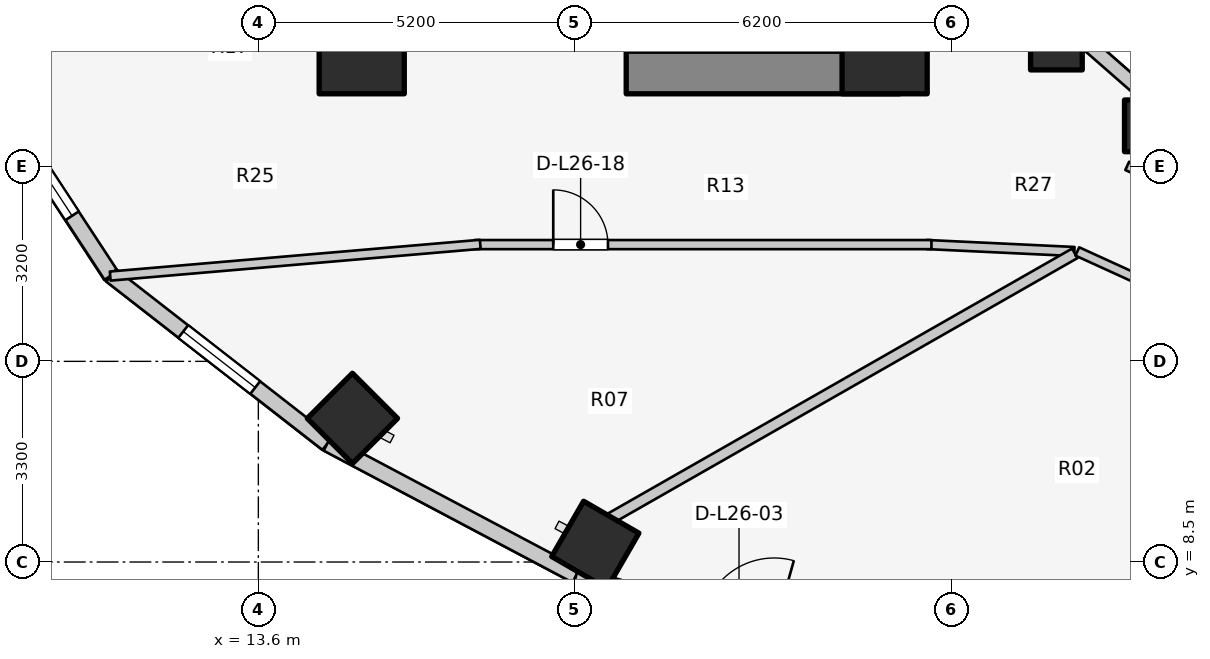
"""IFC4 building model, lengths in metres.
Left out: names, types, materials, properties, quantities, classifications, styles, units other than length and angle.
Written with IfcOpenShell. Run it as: python <this file> out.ifc"""

import sys

from ifc_helpers import new_model, si_unit, direction, frame, frame_2d, origin, origin_2d, place, context, subcontext, project, spatial, rectangle, extrude, element, fill, save


model = new_model("IFC4")
c1 = context("Model", 3, precision=1e-05, world=origin(), true_north=direction((0.0, 1.0)))
c2 = subcontext(c1, "Body", "Model", "MODEL_VIEW")
j1 = project(units=[si_unit("LENGTHUNIT", "METRE"), si_unit("PLANEANGLEUNIT", "RADIAN")], contexts=[c1])
p1 = place(None, origin())
s1 = spatial("IfcSite", under=j1, at=p1, CompositionType="ELEMENT")
p2 = place(p1, origin())
s2 = spatial("IfcBuilding", under=s1, at=p2, CompositionType="ELEMENT")
p3 = place(p2, frame((0.0, 0.0, 88.7)))
s3 = spatial("IfcBuildingStorey", under=s2, at=p3, CompositionType="ELEMENT", Elevation=88.7)
p4 = place(p3, frame((19.65, 16.55, 0.0), z_axis=(0.0, 0.0, 1.0), x_axis=(1.0, 0.0, 0.0)))
e1 = element("IfcWall", 1, at=p4, inside=s3, PredefinedType="SHEAR", context=c2, shape_type="SweptSolid", body=[
    extrude(rectangle(XDim=4.5, YDim=0.7, at=frame_2d((2.25, 0.0))), origin(), (0.0, 0.0, 1.0), 3.1),
])
for number, where, z_axis, x_axis in (
    (2, (15.3, 16.9, 0.0), (0.0, 0.0, 1.0), (1.0, 0.0, 0.0)),
    (3, (23.9, 16.9, 0.0), (0.0, 0.0, 1.0), (1.0, 0.0, 0.0)),
):
    element("IfcColumn", number, at=place(p3, frame(where, z_axis=z_axis, x_axis=x_axis)), inside=s3, PredefinedType="COLUMN", context=c2, shape_type="SweptSolid", body=[
        extrude(rectangle(XDim=1.4, YDim=1.4, at=origin_2d()), origin(), (0.0, 0.0, 1.0), 3.1),
    ])
p5 = place(p3, frame((26.725, 17.018, 0.0), z_axis=(0.0, 0.0, 1.0), x_axis=(1.0, 0.0, 0.0)))
e4 = element("IfcColumn", 4, at=p5, inside=s3, PredefinedType="COLUMN", context=c2, shape_type="SweptSolid", body=[
    extrude(rectangle(XDim=0.85, YDim=0.85, at=origin_2d()), origin(), (0.0, 0.0, 1.0), 3.1),
])
p6 = place(p3, frame((15.147, 10.862, 0.0), z_axis=(0.0, 0.0, 1.0), x_axis=(-0.707106781187, -0.707106781187, 0.0)))
e5 = element("IfcColumn", 5, at=p6, inside=s3, PredefinedType="COLUMN", context=c2, shape_type="SweptSolid", body=[
    extrude(rectangle(XDim=1.05, YDim=1.05, at=origin_2d()), origin(), (0.0, 0.0, 1.0), 3.1),
])
p7 = place(p3, frame((28.27, 15.673, 0.0), z_axis=(0.0, 0.0, 1.0), x_axis=(1.0, 0.0, 0.0)))
e6 = element("IfcColumn", 6, at=p7, inside=s3, PredefinedType="COLUMN", context=c2, shape_type="SweptSolid", body=[
    extrude(rectangle(XDim=0.85, YDim=0.85, at=origin_2d()), origin(), (0.0, 0.0, 1.0), 3.1),
])
p8 = place(p3, frame((19.142, 8.782, 0.0), z_axis=(0.0, 0.0, 1.0), x_axis=(-0.5, -0.866025403784, 0.0)))
e7 = element("IfcColumn", 7, at=p8, inside=s3, PredefinedType="COLUMN", context=c2, shape_type="SweptSolid", body=[
    extrude(rectangle(XDim=1.05, YDim=1.05, at=origin_2d()), origin(), (0.0, 0.0, 1.0), 3.1),
])
p9 = place(p3, frame((26.965, 17.258, 0.0), z_axis=(0.0, 0.0, 1.0), x_axis=(0.752576694707, -0.658504607869, 0.0)))
e8 = element("IfcWall", 8, at=p9, inside=s3, PredefinedType="STANDARD", context=c2, shape_type="SweptSolid", body=[
    extrude(rectangle(XDim=1.959, YDim=0.23, at=frame_2d((0.98, 0.0))), origin(), (0.0, 0.0, 1.0), 2.16),
])
p10 = place(p3, frame((8.578, 17.181, 0.0), z_axis=(0.0, 0.0, 1.0), x_axis=(0.548283220945, -0.836292717672, 0.0)))
e9 = element("IfcWall", 9, at=p10, inside=s3, PredefinedType="STANDARD", context=c2, shape_type="SweptSolid", body=[
    extrude(rectangle(XDim=4.744, YDim=0.26, at=frame_2d((2.372, 0.0))), origin(), (0.0, 0.0, 1.0), 2.85),
])
p11 = place(p10, frame((1.172, 0.0, 0.75)))
e10 = element("IfcOpeningElement", 10, at=p11, cuts=e9, PredefinedType="OPENING", context=c2, shape_type="SweptSolid", body=[
    extrude(rectangle(XDim=2.4, YDim=1.7, at=frame_2d((1.2, 0.85))), frame((0.0, 0.14, 0.0), z_axis=(0.0, -1.0, 0.0), x_axis=(1.0, 0.0, 0.0)), (0.0, 0.0, 1.0), 0.28),
])
p12 = place(p3, frame((11.179, 13.214, 0.0), z_axis=(0.0, 0.0, 1.0), x_axis=(0.789127449954, -0.614229491094, 0.0)))
e11 = element("IfcWall", 11, at=p12, inside=s3, PredefinedType="STANDARD", context=c2, shape_type="SweptSolid", body=[
    extrude(rectangle(XDim=4.505, YDim=0.26, at=frame_2d((2.252, 0.0))), origin(), (0.0, 0.0, 1.0), 2.85),
])
p13 = place(p12, frame((1.502, 0.0, 0.75)))
e12 = element("IfcOpeningElement", 12, at=p13, cuts=e11, PredefinedType="OPENING", context=c2, shape_type="SweptSolid", body=[
    extrude(rectangle(XDim=1.5, YDim=1.6, at=frame_2d((0.75, 0.8))), frame((0.0, 0.14, 0.0), z_axis=(0.0, -1.0, 0.0), x_axis=(1.0, 0.0, 0.0)), (0.0, 0.0, 1.0), 0.28),
])
p14 = place(p3, frame((14.734, 10.447, 0.0), z_axis=(0.0, 0.0, 1.0), x_axis=(0.883668636807, -0.4681129568, 0.0)))
e13 = element("IfcWall", 13, at=p14, inside=s3, PredefinedType="STANDARD", context=c2, shape_type="SweptSolid", body=[
    extrude(rectangle(XDim=4.631, YDim=0.26, at=frame_2d((2.316, 0.0))), origin(), (0.0, 0.0, 1.0), 2.85),
])
p15 = place(p3, frame((18.827, 8.279, 0.0), z_axis=(0.0, 0.0, 1.0), x_axis=(0.962938491413, -0.269721081407, 0.0)))
e14 = element("IfcWall", 14, at=p15, inside=s3, PredefinedType="STANDARD", context=c2, shape_type="SweptSolid", body=[
    extrude(rectangle(XDim=5.563, YDim=0.26, at=frame_2d((2.782, 0.0))), origin(), (0.0, 0.0, 1.0), 2.88),
])
p16 = place(p15, frame((2.182, 0.0, 0.0)))
e15 = element("IfcOpeningElement", 15, at=p16, cuts=e14, PredefinedType="OPENING", context=c2, shape_type="SweptSolid", body=[
    extrude(rectangle(XDim=1.2, YDim=2.2, at=frame_2d((0.6, 1.1))), frame((0.0, 0.14, 0.0), z_axis=(0.0, -1.0, 0.0), x_axis=(1.0, 0.0, 0.0)), (0.0, 0.0, 1.0), 0.28),
])
p17 = place(p3, frame((27.89, 15.015, 0.0), z_axis=(0.0, 0.0, 1.0), x_axis=(0.906943449489, -0.421252393975, 0.0)))
e16 = element("IfcWall", 16, at=p17, inside=s3, PredefinedType="PARTITIONING", context=c2, shape_type="SweptSolid", body=[
    extrude(rectangle(XDim=2.186, YDim=0.15, at=frame_2d((1.093, 0.0))), origin(), (0.0, 0.0, 1.0), 2.272),
])
p18 = place(p3, frame((27.02, 13.606, 0.0), z_axis=(0.0, 0.0, 1.0), x_axis=(-0.998877427952, 0.047369651964, 0.0)))
e17 = element("IfcWall", 17, at=p18, inside=s3, PredefinedType="PARTITIONING", context=c2, shape_type="SweptSolid", body=[
    extrude(rectangle(XDim=2.433, YDim=0.15, at=frame_2d((1.216, 0.0))), origin(), (0.0, 0.0, 1.0), 2.272),
])
p19 = place(p3, frame((17.15, 13.72, 0.0), z_axis=(0.0, 0.0, 1.0), x_axis=(1.0, 0.0, 0.0)))
e18 = element("IfcWall", 18, at=p19, inside=s3, PredefinedType="PARTITIONING", context=c2, shape_type="SweptSolid", body=[
    extrude(rectangle(XDim=7.52, YDim=0.15, at=frame_2d((3.76, 0.0))), origin(), (0.0, 0.0, 1.0), 2.272),
])
p20 = place(p19, frame((1.3, 0.0, 0.0)))
e19 = element("IfcOpeningElement", 19, at=p20, cuts=e18, PredefinedType="OPENING", context=c2, shape_type="SweptSolid", body=[
    extrude(rectangle(XDim=0.9, YDim=2.1, at=frame_2d((0.45, 1.05))), frame((0.0, 0.085, 0.0), z_axis=(0.0, -1.0, 0.0), x_axis=(1.0, 0.0, 0.0)), (0.0, 0.0, 1.0), 0.17),
])
p21 = place(p3, frame((17.25, 13.724, 0.0), z_axis=(0.0, 0.0, 1.0), x_axis=(-0.996341886029, -0.085456691633, 0.0)))
e20 = element("IfcWall", 20, at=p21, inside=s3, PredefinedType="PARTITIONING", context=c2, shape_type="SweptSolid", body=[
    extrude(rectangle(XDim=6.108, YDim=0.15, at=frame_2d((3.054, 0.0))), origin(), (0.0, 0.0, 1.0), 2.142),
])
p22 = place(p3, frame((27.027, 13.576, 0.0), z_axis=(0.0, 0.0, 1.0), x_axis=(-0.868484076301, -0.495717065685, 0.0)))
e21 = element("IfcWall", 21, at=p22, inside=s3, PredefinedType="PARTITIONING", context=c2, shape_type="SweptSolid", body=[
    extrude(rectangle(XDim=8.789, YDim=0.18, at=frame_2d((4.394, 0.0))), origin(), (0.0, 0.0, 1.0), 2.272),
])
p23 = place(p3, frame((27.069, 13.607, 0.0), z_axis=(0.0, 0.0, 1.0), x_axis=(0.909747571199, -0.415161843982, 0.0)))
e22 = element("IfcWall", 22, at=p23, inside=s3, PredefinedType="PARTITIONING", context=c2, shape_type="SweptSolid", body=[
    extrude(rectangle(XDim=2.625, YDim=0.15, at=frame_2d((1.312, 0.0))), origin(), (0.0, 0.0, 1.0), 2.272),
])
p24 = place(p11, origin())
e23 = element("IfcWindow", 23, at=p24, inside=s3, PartitioningType="SINGLE_PANEL", PredefinedType="WINDOW", context=c2, shape_type="SweptSolid", body=[
    extrude(rectangle(XDim=2.4, YDim=1.7, at=frame_2d((1.2, 0.85))), frame((0.0, 0.03, 0.0), z_axis=(0.0, -1.0, 0.0), x_axis=(1.0, 0.0, 0.0)), (0.0, 0.0, 1.0), 0.06),
])
fill(e10, e23)
p25 = place(p13, origin())
e24 = element("IfcWindow", 24, at=p25, inside=s3, PartitioningType="SINGLE_PANEL", PredefinedType="WINDOW", context=c2, shape_type="SweptSolid", body=[
    extrude(rectangle(XDim=1.5, YDim=1.6, at=frame_2d((0.75, 0.8))), frame((0.0, 0.03, 0.0), z_axis=(0.0, -1.0, 0.0), x_axis=(1.0, 0.0, 0.0)), (0.0, 0.0, 1.0), 0.06),
])
fill(e12, e24)
p26 = place(p20, origin())
e25 = element("IfcDoor", 25, at=p26, inside=s3, OperationType="SINGLE_SWING_LEFT", PredefinedType="DOOR", context=c2, shape_type="SweptSolid", body=[
    extrude(rectangle(XDim=0.9, YDim=2.1, at=frame_2d((0.45, 1.05))), frame((0.0, 0.025, 0.0), z_axis=(0.0, -1.0, 0.0), x_axis=(1.0, 0.0, 0.0)), (0.0, 0.0, 1.0), 0.05),
])
fill(e19, e25)
save(model, sys.argv[1])
